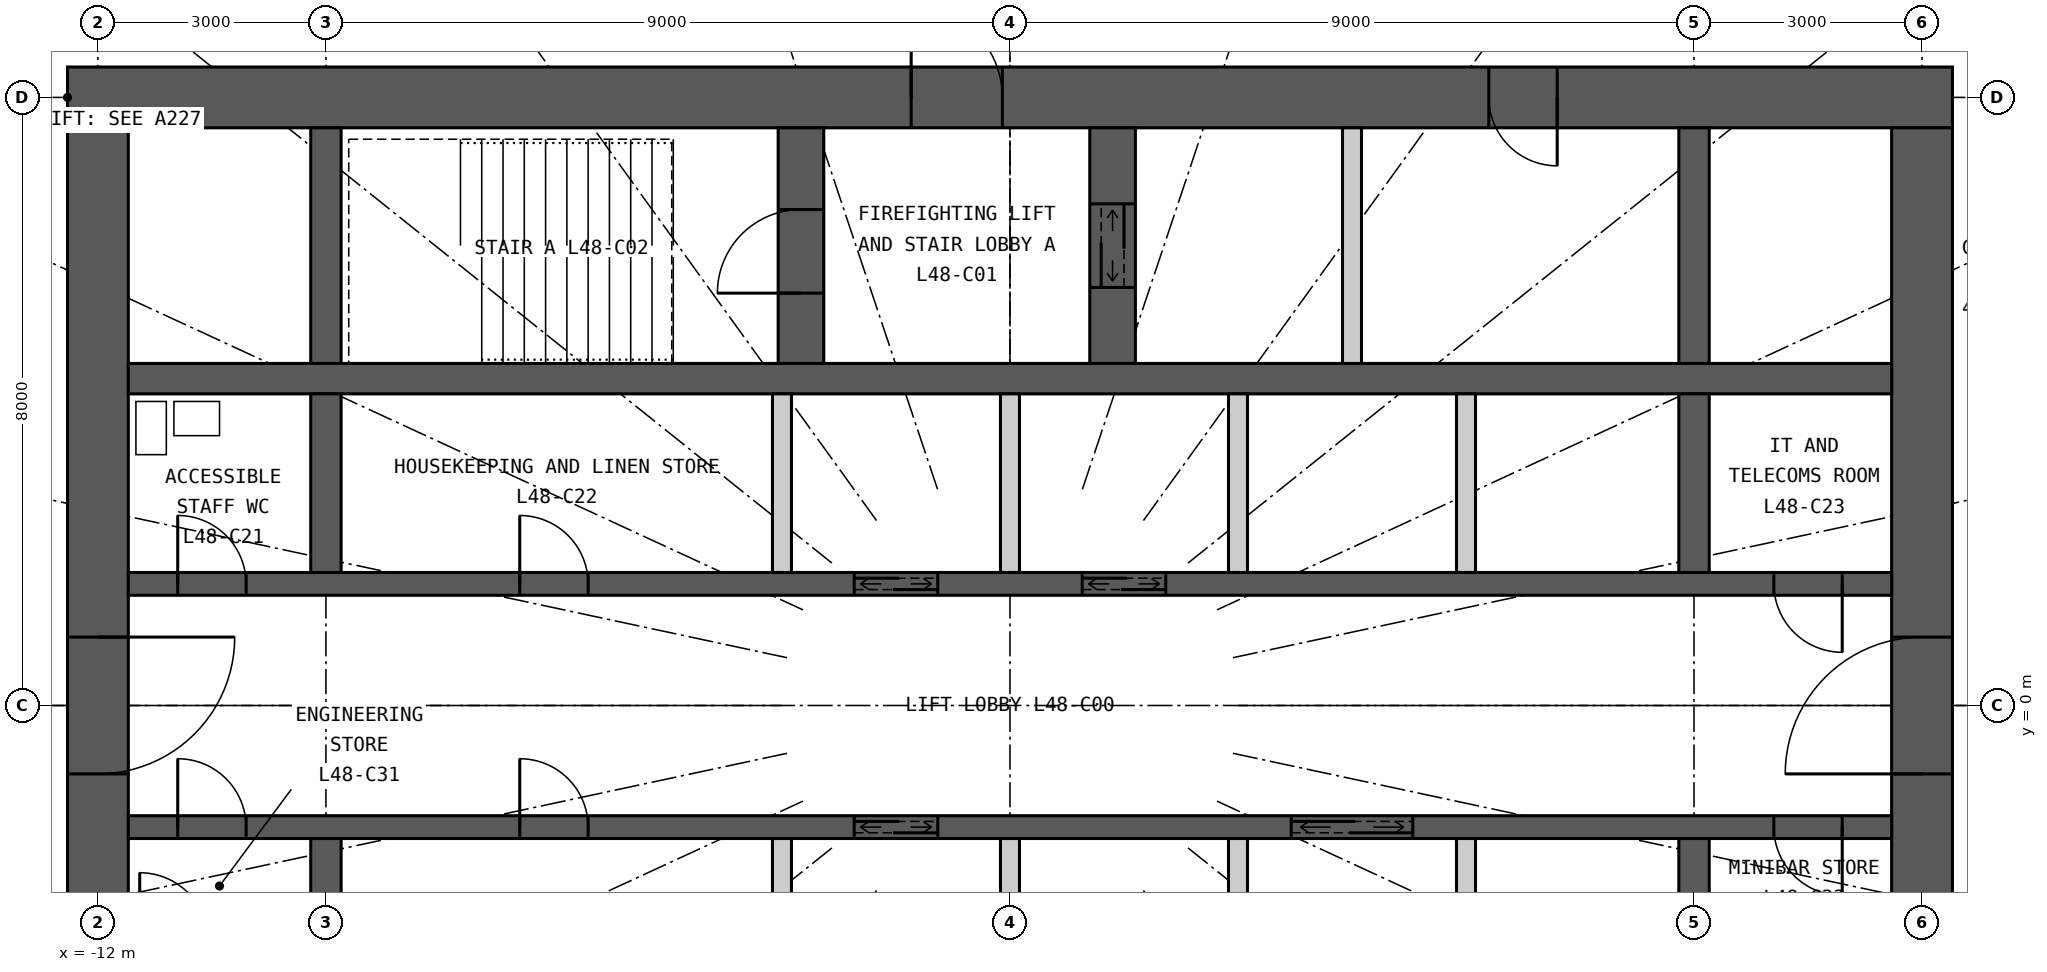
"""IFC4 building model, lengths in metres.
Left out: names, types, materials, properties, quantities, classifications, styles, units other than length and angle.
Written with IfcOpenShell. Run it as: python <this file> out.ifc"""

import sys

from ifc_helpers import new_model, si_unit, direction, frame, frame_2d, origin, place, context, subcontext, project, spatial, rectangle, extrude, element, fill, save


model = new_model("IFC4")
c1 = context("Model", 3, precision=1e-05, world=origin(), true_north=direction((0.0, 1.0)))
c2 = subcontext(c1, "Body", "Model", "MODEL_VIEW")
j1 = project(units=[si_unit("LENGTHUNIT", "METRE"), si_unit("PLANEANGLEUNIT", "RADIAN")], contexts=[c1])
p1 = place(None, origin())
s1 = spatial("IfcSite", under=j1, at=p1, CompositionType="ELEMENT")
p2 = place(p1, origin())
s2 = spatial("IfcBuilding", under=s1, at=p2, CompositionType="ELEMENT")
p3 = place(p2, frame((0.0, 0.0, 179.7)))
s3 = spatial("IfcBuildingStorey", under=s2, at=p3, CompositionType="ELEMENT", Elevation=179.7)
p4 = place(p3, frame((-12.4, 8.0, 0.0), z_axis=(0.0, 0.0, 1.0), x_axis=(1.0, 0.0, 0.0)))
e1 = element("IfcWall", 1, at=p4, inside=s3, PredefinedType="SHEAR", context=c2, shape_type="SweptSolid", body=[
    extrude(rectangle(XDim=24.8, YDim=0.8, at=frame_2d((12.4, 0.0))), origin(), (0.0, 0.0, 1.0), 3.3),
])
p5 = place(p4, frame((11.1, 0.0, 0.0)))
e2 = element("IfcOpeningElement", 2, at=p5, cuts=e1, PredefinedType="OPENING", context=c2, shape_type="SweptSolid", body=[
    extrude(rectangle(XDim=1.2, YDim=2.2, at=frame_2d((0.6, 1.1))), frame((0.0, 0.41, 0.0), z_axis=(0.0, -1.0, 0.0), x_axis=(1.0, 0.0, 0.0)), (0.0, 0.0, 1.0), 0.82),
])
p6 = place(p4, frame((18.7, 0.0, 0.0)))
e3 = element("IfcOpeningElement", 3, at=p6, cuts=e1, PredefinedType="OPENING", context=c2, shape_type="SweptSolid", body=[
    extrude(rectangle(XDim=0.9, YDim=2.2, at=frame_2d((0.45, 1.1))), frame((0.0, 0.41, 0.0), z_axis=(0.0, -1.0, 0.0), x_axis=(1.0, 0.0, 0.0)), (0.0, 0.0, 1.0), 0.82),
])
p7 = place(p3, frame((12.0, -7.6, 0.0), z_axis=(0.0, 0.0, 1.0), x_axis=(0.0, 1.0, 0.0)))
e4 = element("IfcWall", 4, at=p7, inside=s3, PredefinedType="SHEAR", context=c2, shape_type="SweptSolid", body=[
    extrude(rectangle(XDim=15.2, YDim=0.8, at=frame_2d((7.6, 0.0))), origin(), (0.0, 0.0, 1.0), 3.3),
])
p8 = place(p7, frame((6.7, 0.0, 0.0)))
e5 = element("IfcOpeningElement", 5, at=p8, cuts=e4, PredefinedType="OPENING", context=c2, shape_type="SweptSolid", body=[
    extrude(rectangle(XDim=1.8, YDim=2.2, at=frame_2d((0.9, 1.1))), frame((0.0, 0.41, 0.0), z_axis=(0.0, -1.0, 0.0), x_axis=(1.0, 0.0, 0.0)), (0.0, 0.0, 1.0), 0.82),
])
p9 = place(p3, frame((-12.0, 7.6, 0.0), z_axis=(0.0, 0.0, 1.0), x_axis=(0.0, -1.0, 0.0)))
e6 = element("IfcWall", 6, at=p9, inside=s3, PredefinedType="SHEAR", context=c2, shape_type="SweptSolid", body=[
    extrude(rectangle(XDim=15.2, YDim=0.8, at=frame_2d((7.6, 0.0))), origin(), (0.0, 0.0, 1.0), 3.3),
])
p10 = place(p9, frame((6.7, 0.0, 0.0)))
e7 = element("IfcOpeningElement", 7, at=p10, cuts=e6, PredefinedType="OPENING", context=c2, shape_type="SweptSolid", body=[
    extrude(rectangle(XDim=1.8, YDim=2.2, at=frame_2d((0.9, 1.1))), frame((0.0, 0.41, 0.0), z_axis=(0.0, -1.0, 0.0), x_axis=(1.0, 0.0, 0.0)), (0.0, 0.0, 1.0), 0.82),
])
p11 = place(p3, frame((-11.6, 4.3, 0.0), z_axis=(0.0, 0.0, 1.0), x_axis=(1.0, 0.0, 0.0)))
e8 = element("IfcWall", 8, at=p11, inside=s3, PredefinedType="SHEAR", context=c2, shape_type="SweptSolid", body=[
    extrude(rectangle(XDim=23.2, YDim=0.4, at=frame_2d((11.6, 0.0))), origin(), (0.0, 0.0, 1.0), 3.3),
])
p12 = place(p3, frame((-11.6, 1.6, 0.0), z_axis=(0.0, 0.0, 1.0), x_axis=(1.0, 0.0, 0.0)))
e9 = element("IfcWall", 9, at=p12, inside=s3, PredefinedType="SHEAR", context=c2, shape_type="SweptSolid", body=[
    extrude(rectangle(XDim=23.2, YDim=0.3, at=frame_2d((11.6, 0.0))), origin(), (0.0, 0.0, 1.0), 3.3),
])
p13 = place(p12, frame((9.55, 0.0, 0.0)))
e10 = element("IfcOpeningElement", 10, at=p13, cuts=e9, PredefinedType="OPENING", context=c2, shape_type="SweptSolid", body=[
    extrude(rectangle(XDim=1.1, YDim=2.2, at=frame_2d((0.55, 1.1))), frame((0.0, 0.16, 0.0), z_axis=(0.0, -1.0, 0.0), x_axis=(1.0, 0.0, 0.0)), (0.0, 0.0, 1.0), 0.32),
])
p14 = place(p12, frame((12.55, 0.0, 0.0)))
e11 = element("IfcOpeningElement", 11, at=p14, cuts=e9, PredefinedType="OPENING", context=c2, shape_type="SweptSolid", body=[
    extrude(rectangle(XDim=1.1, YDim=2.2, at=frame_2d((0.55, 1.1))), frame((0.0, 0.16, 0.0), z_axis=(0.0, -1.0, 0.0), x_axis=(1.0, 0.0, 0.0)), (0.0, 0.0, 1.0), 0.32),
])
p15 = place(p12, frame((0.65, 0.0, 0.0)))
e12 = element("IfcOpeningElement", 12, at=p15, cuts=e9, PredefinedType="OPENING", context=c2, shape_type="SweptSolid", body=[
    extrude(rectangle(XDim=0.9, YDim=2.2, at=frame_2d((0.45, 1.1))), frame((0.0, 0.16, 0.0), z_axis=(0.0, -1.0, 0.0), x_axis=(1.0, 0.0, 0.0)), (0.0, 0.0, 1.0), 0.32),
])
p16 = place(p12, frame((5.15, 0.0, 0.0)))
e13 = element("IfcOpeningElement", 13, at=p16, cuts=e9, PredefinedType="OPENING", context=c2, shape_type="SweptSolid", body=[
    extrude(rectangle(XDim=0.9, YDim=2.2, at=frame_2d((0.45, 1.1))), frame((0.0, 0.16, 0.0), z_axis=(0.0, -1.0, 0.0), x_axis=(1.0, 0.0, 0.0)), (0.0, 0.0, 1.0), 0.32),
])
p17 = place(p12, frame((21.65, 0.0, 0.0)))
e14 = element("IfcOpeningElement", 14, at=p17, cuts=e9, PredefinedType="OPENING", context=c2, shape_type="SweptSolid", body=[
    extrude(rectangle(XDim=0.9, YDim=2.2, at=frame_2d((0.45, 1.1))), frame((0.0, 0.16, 0.0), z_axis=(0.0, -1.0, 0.0), x_axis=(1.0, 0.0, 0.0)), (0.0, 0.0, 1.0), 0.32),
])
p18 = place(p3, frame((-11.6, -1.6, 0.0), z_axis=(0.0, 0.0, 1.0), x_axis=(1.0, 0.0, 0.0)))
e15 = element("IfcWall", 15, at=p18, inside=s3, PredefinedType="SHEAR", context=c2, shape_type="SweptSolid", body=[
    extrude(rectangle(XDim=23.2, YDim=0.3, at=frame_2d((11.6, 0.0))), origin(), (0.0, 0.0, 1.0), 3.3),
])
p19 = place(p18, frame((9.55, 0.0, 0.0)))
e16 = element("IfcOpeningElement", 16, at=p19, cuts=e15, PredefinedType="OPENING", context=c2, shape_type="SweptSolid", body=[
    extrude(rectangle(XDim=1.1, YDim=2.2, at=frame_2d((0.55, 1.1))), frame((0.0, 0.16, 0.0), z_axis=(0.0, -1.0, 0.0), x_axis=(1.0, 0.0, 0.0)), (0.0, 0.0, 1.0), 0.32),
])
p20 = place(p18, frame((15.3, 0.0, 0.0)))
e17 = element("IfcOpeningElement", 17, at=p20, cuts=e15, PredefinedType="OPENING", context=c2, shape_type="SweptSolid", body=[
    extrude(rectangle(XDim=1.6, YDim=2.4, at=frame_2d((0.8, 1.2))), frame((0.0, 0.16, 0.0), z_axis=(0.0, -1.0, 0.0), x_axis=(1.0, 0.0, 0.0)), (0.0, 0.0, 1.0), 0.32),
])
p21 = place(p18, frame((0.65, 0.0, 0.0)))
e18 = element("IfcOpeningElement", 18, at=p21, cuts=e15, PredefinedType="OPENING", context=c2, shape_type="SweptSolid", body=[
    extrude(rectangle(XDim=0.9, YDim=2.2, at=frame_2d((0.45, 1.1))), frame((0.0, 0.16, 0.0), z_axis=(0.0, -1.0, 0.0), x_axis=(1.0, 0.0, 0.0)), (0.0, 0.0, 1.0), 0.32),
])
p22 = place(p18, frame((5.15, 0.0, 0.0)))
e19 = element("IfcOpeningElement", 19, at=p22, cuts=e15, PredefinedType="OPENING", context=c2, shape_type="SweptSolid", body=[
    extrude(rectangle(XDim=0.9, YDim=2.2, at=frame_2d((0.45, 1.1))), frame((0.0, 0.16, 0.0), z_axis=(0.0, -1.0, 0.0), x_axis=(1.0, 0.0, 0.0)), (0.0, 0.0, 1.0), 0.32),
])
p23 = place(p18, frame((21.65, 0.0, 0.0)))
e20 = element("IfcOpeningElement", 20, at=p23, cuts=e15, PredefinedType="OPENING", context=c2, shape_type="SweptSolid", body=[
    extrude(rectangle(XDim=0.9, YDim=2.2, at=frame_2d((0.45, 1.1))), frame((0.0, 0.16, 0.0), z_axis=(0.0, -1.0, 0.0), x_axis=(1.0, 0.0, 0.0)), (0.0, 0.0, 1.0), 0.32),
])
p24 = place(p3, frame((-9.0, 4.5, 0.0), z_axis=(0.0, 0.0, 1.0), x_axis=(0.0, 1.0, 0.0)))
e21 = element("IfcWall", 21, at=p24, inside=s3, PredefinedType="SHEAR", context=c2, shape_type="SweptSolid", body=[
    extrude(rectangle(XDim=3.1, YDim=0.4, at=frame_2d((1.55, 0.0))), origin(), (0.0, 0.0, 1.0), 3.3),
])
for number, where, z_axis, x_axis in (
    (22, (-9.0, 1.75, 0.0), (0.0, 0.0, 1.0), (0.0, 1.0, 0.0)),
    (23, (-9.0, -4.1, 0.0), (0.0, 0.0, 1.0), (0.0, 1.0, 0.0)),
):
    element("IfcWall", number, at=place(p3, frame(where, z_axis=z_axis, x_axis=x_axis)), inside=s3, PredefinedType="SHEAR", context=c2, shape_type="SweptSolid", body=[
        extrude(rectangle(XDim=2.35, YDim=0.4, at=frame_2d((1.175, 0.0))), origin(), (0.0, 0.0, 1.0), 3.3),
    ])
p25 = place(p3, frame((9.0, 4.5, 0.0), z_axis=(0.0, 0.0, 1.0), x_axis=(0.0, 1.0, 0.0)))
e24 = element("IfcWall", 24, at=p25, inside=s3, PredefinedType="SHEAR", context=c2, shape_type="SweptSolid", body=[
    extrude(rectangle(XDim=3.1, YDim=0.4, at=frame_2d((1.55, 0.0))), origin(), (0.0, 0.0, 1.0), 3.3),
])
for number, where, z_axis, x_axis in (
    (25, (9.0, 1.75, 0.0), (0.0, 0.0, 1.0), (0.0, 1.0, 0.0)),
    (26, (9.0, -4.1, 0.0), (0.0, 0.0, 1.0), (0.0, 1.0, 0.0)),
):
    element("IfcWall", number, at=place(p3, frame(where, z_axis=z_axis, x_axis=x_axis)), inside=s3, PredefinedType="SHEAR", context=c2, shape_type="SweptSolid", body=[
        extrude(rectangle(XDim=2.35, YDim=0.4, at=frame_2d((1.175, 0.0))), origin(), (0.0, 0.0, 1.0), 3.3),
    ])
p26 = place(p3, frame((-2.75, 4.5, 0.0), z_axis=(0.0, 0.0, 1.0), x_axis=(0.0, 1.0, 0.0)))
e27 = element("IfcWall", 27, at=p26, inside=s3, PredefinedType="SHEAR", context=c2, shape_type="SweptSolid", body=[
    extrude(rectangle(XDim=3.1, YDim=0.6, at=frame_2d((1.55, 0.0))), origin(), (0.0, 0.0, 1.0), 3.3),
])
p27 = place(p26, frame((0.925, 0.0, 0.0)))
e28 = element("IfcOpeningElement", 28, at=p27, cuts=e27, PredefinedType="OPENING", context=c2, shape_type="SweptSolid", body=[
    extrude(rectangle(XDim=1.1, YDim=2.2, at=frame_2d((0.55, 1.1))), frame((0.0, 0.31, 0.0), z_axis=(0.0, -1.0, 0.0), x_axis=(1.0, 0.0, 0.0)), (0.0, 0.0, 1.0), 0.62),
])
p28 = place(p3, frame((1.35, 4.5, 0.0), z_axis=(0.0, 0.0, 1.0), x_axis=(0.0, 1.0, 0.0)))
e29 = element("IfcWall", 29, at=p28, inside=s3, PredefinedType="SHEAR", context=c2, shape_type="SweptSolid", body=[
    extrude(rectangle(XDim=3.1, YDim=0.6, at=frame_2d((1.55, 0.0))), origin(), (0.0, 0.0, 1.0), 3.3),
])
p29 = place(p28, frame((1.0, 0.0, 0.0)))
e30 = element("IfcOpeningElement", 30, at=p29, cuts=e29, PredefinedType="OPENING", context=c2, shape_type="SweptSolid", body=[
    extrude(rectangle(XDim=1.1, YDim=2.2, at=frame_2d((0.55, 1.1))), frame((0.0, 0.31, 0.0), z_axis=(0.0, -1.0, 0.0), x_axis=(1.0, 0.0, 0.0)), (0.0, 0.0, 1.0), 0.62),
])
p30 = place(p3, frame((4.5, 4.5, 0.0), z_axis=(0.0, 0.0, 1.0), x_axis=(0.0, 1.0, 0.0)))
e31 = element("IfcWall", 31, at=p30, inside=s3, PredefinedType="PARTITIONING", context=c2, shape_type="SweptSolid", body=[
    extrude(rectangle(XDim=3.1, YDim=0.25, at=frame_2d((1.55, 0.0))), origin(), (0.0, 0.0, 1.0), 3.3),
])
for number, where, z_axis, x_axis in (
    (32, (-3.0, 1.75, 0.0), (0.0, 0.0, 1.0), (0.0, 1.0, 0.0)),
    (33, (0.0, 1.75, 0.0), (0.0, 0.0, 1.0), (0.0, 1.0, 0.0)),
    (34, (3.0, 1.75, 0.0), (0.0, 0.0, 1.0), (0.0, 1.0, 0.0)),
    (35, (6.0, 1.75, 0.0), (0.0, 0.0, 1.0), (0.0, 1.0, 0.0)),
    (36, (-3.0, -4.1, 0.0), (0.0, 0.0, 1.0), (0.0, 1.0, 0.0)),
    (37, (0.0, -4.1, 0.0), (0.0, 0.0, 1.0), (0.0, 1.0, 0.0)),
    (38, (3.0, -4.1, 0.0), (0.0, 0.0, 1.0), (0.0, 1.0, 0.0)),
    (39, (6.0, -4.1, 0.0), (0.0, 0.0, 1.0), (0.0, 1.0, 0.0)),
):
    element("IfcWall", number, at=place(p3, frame(where, z_axis=z_axis, x_axis=x_axis)), inside=s3, PredefinedType="PARTITIONING", context=c2, shape_type="SweptSolid", body=[
        extrude(rectangle(XDim=2.35, YDim=0.25, at=frame_2d((1.175, 0.0))), origin(), (0.0, 0.0, 1.0), 3.3),
    ])
p31 = place(p5, origin())
e40 = element("IfcDoor", 40, at=p31, inside=s3, OperationType="SINGLE_SWING_LEFT", PredefinedType="DOOR", context=c2, shape_type="SweptSolid", body=[
    extrude(rectangle(XDim=1.2, YDim=2.2, at=frame_2d((0.6, 1.1))), frame((0.0, 0.025, 0.0), z_axis=(0.0, -1.0, 0.0), x_axis=(1.0, 0.0, 0.0)), (0.0, 0.0, 1.0), 0.05),
])
fill(e2, e40)
p32 = place(p27, origin())
e41 = element("IfcDoor", 41, at=p32, inside=s3, OperationType="SINGLE_SWING_LEFT", PredefinedType="DOOR", context=c2, shape_type="SweptSolid", body=[
    extrude(rectangle(XDim=1.1, YDim=2.2, at=frame_2d((0.55, 1.1))), frame((0.0, 0.025, 0.0), z_axis=(0.0, -1.0, 0.0), x_axis=(1.0, 0.0, 0.0)), (0.0, 0.0, 1.0), 0.05),
])
fill(e28, e41)
p33 = place(p29, origin())
e42 = element("IfcDoor", 42, at=p33, inside=s3, OperationType="DOUBLE_DOOR_SLIDING", PredefinedType="DOOR", context=c2, shape_type="SweptSolid", body=[
    extrude(rectangle(XDim=1.1, YDim=2.2, at=frame_2d((0.55, 1.1))), frame((0.0, 0.025, 0.0), z_axis=(0.0, -1.0, 0.0), x_axis=(1.0, 0.0, 0.0)), (0.0, 0.0, 1.0), 0.05),
])
fill(e30, e42)
p34 = place(p6, origin())
e43 = element("IfcDoor", 43, at=p34, inside=s3, OperationType="SINGLE_SWING_RIGHT", PredefinedType="DOOR", context=c2, shape_type="SweptSolid", body=[
    extrude(rectangle(XDim=0.9, YDim=2.2, at=frame_2d((0.45, 1.1))), frame((0.0, 0.025, 0.0), z_axis=(0.0, -1.0, 0.0), x_axis=(1.0, 0.0, 0.0)), (0.0, 0.0, 1.0), 0.05),
])
fill(e3, e43)
p35 = place(p13, origin())
e44 = element("IfcDoor", 44, at=p35, inside=s3, OperationType="DOUBLE_DOOR_SLIDING", PredefinedType="DOOR", context=c2, shape_type="SweptSolid", body=[
    extrude(rectangle(XDim=1.1, YDim=2.2, at=frame_2d((0.55, 1.1))), frame((0.0, 0.025, 0.0), z_axis=(0.0, -1.0, 0.0), x_axis=(1.0, 0.0, 0.0)), (0.0, 0.0, 1.0), 0.05),
])
fill(e10, e44)
p36 = place(p14, origin())
e45 = element("IfcDoor", 45, at=p36, inside=s3, OperationType="DOUBLE_DOOR_SLIDING", PredefinedType="DOOR", context=c2, shape_type="SweptSolid", body=[
    extrude(rectangle(XDim=1.1, YDim=2.2, at=frame_2d((0.55, 1.1))), frame((0.0, 0.025, 0.0), z_axis=(0.0, -1.0, 0.0), x_axis=(1.0, 0.0, 0.0)), (0.0, 0.0, 1.0), 0.05),
])
fill(e11, e45)
p37 = place(p19, origin())
e46 = element("IfcDoor", 46, at=p37, inside=s3, OperationType="DOUBLE_DOOR_SLIDING", PredefinedType="DOOR", context=c2, shape_type="SweptSolid", body=[
    extrude(rectangle(XDim=1.1, YDim=2.2, at=frame_2d((0.55, 1.1))), frame((0.0, 0.025, 0.0), z_axis=(0.0, -1.0, 0.0), x_axis=(1.0, 0.0, 0.0)), (0.0, 0.0, 1.0), 0.05),
])
fill(e16, e46)
p38 = place(p20, origin())
e47 = element("IfcDoor", 47, at=p38, inside=s3, OperationType="DOUBLE_DOOR_SLIDING", PredefinedType="DOOR", context=c2, shape_type="SweptSolid", body=[
    extrude(rectangle(XDim=1.6, YDim=2.4, at=frame_2d((0.8, 1.2))), frame((0.0, 0.025, 0.0), z_axis=(0.0, -1.0, 0.0), x_axis=(1.0, 0.0, 0.0)), (0.0, 0.0, 1.0), 0.05),
])
fill(e17, e47)
p39 = place(p15, origin())
e48 = element("IfcDoor", 48, at=p39, inside=s3, OperationType="SINGLE_SWING_LEFT", PredefinedType="DOOR", context=c2, shape_type="SweptSolid", body=[
    extrude(rectangle(XDim=0.9, YDim=2.2, at=frame_2d((0.45, 1.1))), frame((0.0, 0.025, 0.0), z_axis=(0.0, -1.0, 0.0), x_axis=(1.0, 0.0, 0.0)), (0.0, 0.0, 1.0), 0.05),
])
fill(e12, e48)
p40 = place(p16, origin())
e49 = element("IfcDoor", 49, at=p40, inside=s3, OperationType="SINGLE_SWING_LEFT", PredefinedType="DOOR", context=c2, shape_type="SweptSolid", body=[
    extrude(rectangle(XDim=0.9, YDim=2.2, at=frame_2d((0.45, 1.1))), frame((0.0, 0.025, 0.0), z_axis=(0.0, -1.0, 0.0), x_axis=(1.0, 0.0, 0.0)), (0.0, 0.0, 1.0), 0.05),
])
fill(e13, e49)
p41 = place(p17, origin())
e50 = element("IfcDoor", 50, at=p41, inside=s3, OperationType="SINGLE_SWING_RIGHT", PredefinedType="DOOR", context=c2, shape_type="SweptSolid", body=[
    extrude(rectangle(XDim=0.9, YDim=2.2, at=frame_2d((0.45, 1.1))), frame((0.0, 0.025, 0.0), z_axis=(0.0, -1.0, 0.0), x_axis=(1.0, 0.0, 0.0)), (0.0, 0.0, 1.0), 0.05),
])
fill(e14, e50)
p42 = place(p21, origin())
e51 = element("IfcDoor", 51, at=p42, inside=s3, OperationType="SINGLE_SWING_LEFT", PredefinedType="DOOR", context=c2, shape_type="SweptSolid", body=[
    extrude(rectangle(XDim=0.9, YDim=2.2, at=frame_2d((0.45, 1.1))), frame((0.0, 0.025, 0.0), z_axis=(0.0, -1.0, 0.0), x_axis=(1.0, 0.0, 0.0)), (0.0, 0.0, 1.0), 0.05),
])
fill(e18, e51)
p43 = place(p22, origin())
e52 = element("IfcDoor", 52, at=p43, inside=s3, OperationType="SINGLE_SWING_LEFT", PredefinedType="DOOR", context=c2, shape_type="SweptSolid", body=[
    extrude(rectangle(XDim=0.9, YDim=2.2, at=frame_2d((0.45, 1.1))), frame((0.0, 0.025, 0.0), z_axis=(0.0, -1.0, 0.0), x_axis=(1.0, 0.0, 0.0)), (0.0, 0.0, 1.0), 0.05),
])
fill(e19, e52)
p44 = place(p23, origin())
e53 = element("IfcDoor", 53, at=p44, inside=s3, OperationType="SINGLE_SWING_RIGHT", PredefinedType="DOOR", context=c2, shape_type="SweptSolid", body=[
    extrude(rectangle(XDim=0.9, YDim=2.2, at=frame_2d((0.45, 1.1))), frame((0.0, 0.025, 0.0), z_axis=(0.0, -1.0, 0.0), x_axis=(1.0, 0.0, 0.0)), (0.0, 0.0, 1.0), 0.05),
])
fill(e20, e53)
p45 = place(p8, origin())
e54 = element("IfcDoor", 54, at=p45, inside=s3, OperationType="DOUBLE_DOOR_DOUBLE_SWING", PredefinedType="DOOR", context=c2, shape_type="SweptSolid", body=[
    extrude(rectangle(XDim=1.8, YDim=2.2, at=frame_2d((0.9, 1.1))), frame((0.0, 0.025, 0.0), z_axis=(0.0, -1.0, 0.0), x_axis=(1.0, 0.0, 0.0)), (0.0, 0.0, 1.0), 0.05),
])
fill(e5, e54)
p46 = place(p10, origin())
e55 = element("IfcDoor", 55, at=p46, inside=s3, OperationType="DOUBLE_DOOR_DOUBLE_SWING", PredefinedType="DOOR", context=c2, shape_type="SweptSolid", body=[
    extrude(rectangle(XDim=1.8, YDim=2.2, at=frame_2d((0.9, 1.1))), frame((0.0, 0.025, 0.0), z_axis=(0.0, -1.0, 0.0), x_axis=(1.0, 0.0, 0.0)), (0.0, 0.0, 1.0), 0.05),
])
fill(e7, e55)
save(model, sys.argv[1])
